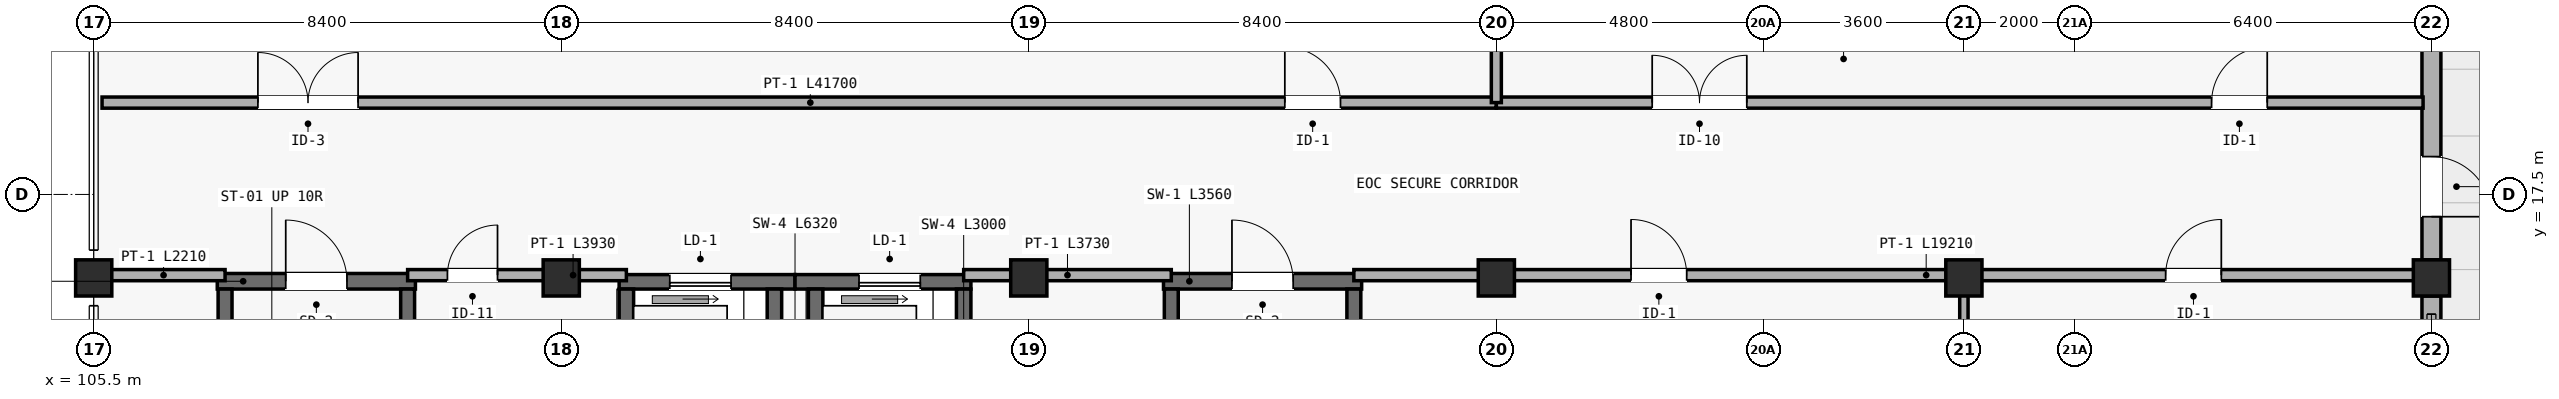
"""IFC4 building model, lengths in metres.
Left out: names, types, materials, properties, quantities, classifications, styles, units other than length and angle.
Written with IfcOpenShell. Run it as: python <this file> out.ifc"""

import sys

from ifc_helpers import new_model, si_unit, direction, frame, frame_2d, origin, origin_2d, place, context, subcontext, project, spatial, rectangle, extrude, element, fill, save


model = new_model("IFC4")
c1 = context("Model", 3, precision=1e-05, world=origin(), true_north=direction((0.0, 1.0)))
c2 = subcontext(c1, "Body", "Model", "MODEL_VIEW")
j1 = project(units=[si_unit("LENGTHUNIT", "METRE"), si_unit("PLANEANGLEUNIT", "RADIAN")], contexts=[c1])
p1 = place(None, origin())
s1 = spatial("IfcSite", under=j1, at=p1, CompositionType="ELEMENT")
p2 = place(p1, origin())
s2 = spatial("IfcBuilding", under=s1, at=p2, CompositionType="ELEMENT")
p3 = place(p2, frame((0.0, 0.0, 9.3)))
s3 = spatial("IfcBuildingStorey", under=s2, at=p3, CompositionType="ELEMENT", Elevation=9.3)
for number, where, z_axis, x_axis in (
    (1, (105.5, 16.0, 0.0), (0.0, 0.0, 1.0), (1.0, 0.0, 0.0)),
    (2, (113.9, 16.0, 0.0), (0.0, 0.0, 1.0), (1.0, 0.0, 0.0)),
    (3, (122.3, 16.0, 0.0), (0.0, 0.0, 1.0), (1.0, 0.0, 0.0)),
    (4, (130.7, 16.0, 0.0), (0.0, 0.0, 1.0), (1.0, 0.0, 0.0)),
    (5, (139.1, 16.0, 0.0), (0.0, 0.0, 1.0), (1.0, 0.0, 0.0)),
    (6, (147.5, 16.0, 0.0), (0.0, 0.0, 1.0), (1.0, 0.0, 0.0)),
):
    element("IfcColumn", number, at=place(p3, frame(where, z_axis=z_axis, x_axis=x_axis)), inside=s3, PredefinedType="COLUMN", context=c2, shape_type="SweptSolid", body=[
        extrude(rectangle(XDim=0.65, YDim=0.65, at=origin_2d()), origin(), (0.0, 0.0, 1.0), 3.45),
    ])
p4 = place(p3, frame((147.5, 9.325, 0.0), z_axis=(0.0, 0.0, 1.0), x_axis=(0.0, 1.0, 0.0)))
e7 = element("IfcWall", 7, at=p4, inside=s3, PredefinedType="STANDARD", context=c2, shape_type="SweptSolid", body=[
    extrude(rectangle(XDim=6.35, YDim=0.34, at=frame_2d((3.175, 0.0))), origin(), (0.0, 0.0, 1.0), 2.75),
])
p5 = place(p3, frame((147.5, 16.325, 0.0), z_axis=(0.0, 0.0, 1.0), x_axis=(0.0, 1.0, 0.0)))
e8 = element("IfcWall", 8, at=p5, inside=s3, PredefinedType="STANDARD", context=c2, shape_type="SweptSolid", body=[
    extrude(rectangle(XDim=7.85, YDim=0.34, at=frame_2d((3.925, 0.0))), origin(), (0.0, 0.0, 1.0), 2.75),
])
p6 = place(p5, frame((0.775, 0.0, 0.0)))
e9 = element("IfcOpeningElement", 9, at=p6, cuts=e8, PredefinedType="OPENING", context=c2, shape_type="SweptSolid", body=[
    extrude(rectangle(XDim=1.08, YDim=2.1, at=frame_2d((0.54, 1.05))), frame((0.0, 0.18, 0.0), z_axis=(0.0, -1.0, 0.0), x_axis=(1.0, 0.0, 0.0)), (0.0, 0.0, 1.0), 0.36),
])
p7 = place(p5, frame((3.925, 0.0, 0.75)))
e10 = element("IfcOpeningElement", 10, at=p7, cuts=e8, PredefinedType="OPENING", context=c2, shape_type="SweptSolid", body=[
    extrude(rectangle(XDim=1.75, YDim=1.55, at=frame_2d((0.875, 0.775))), frame((0.0, 0.18, 0.0), z_axis=(0.0, -1.0, 0.0), x_axis=(1.0, 0.0, 0.0)), (0.0, 0.0, 1.0), 0.36),
])
p8 = place(p3, frame((107.72, 15.94, 0.0), z_axis=(0.0, 0.0, 1.0), x_axis=(1.0, 0.0, 0.0)))
e11 = element("IfcWall", 11, at=p8, inside=s3, PredefinedType="SHEAR", context=c2, shape_type="SweptSolid", body=[
    extrude(rectangle(XDim=3.56, YDim=0.28, at=frame_2d((1.78, 0.0))), origin(), (0.0, 0.0, 1.0), 3.2),
])
p9 = place(p8, frame((1.23, 0.0, 0.0)))
e12 = element("IfcOpeningElement", 12, at=p9, cuts=e11, PredefinedType="OPENING", context=c2, shape_type="SweptSolid", body=[
    extrude(rectangle(XDim=1.1, YDim=2.15, at=frame_2d((0.55, 1.075))), frame((0.0, 0.15, 0.0), z_axis=(0.0, -1.0, 0.0), x_axis=(1.0, 0.0, 0.0)), (0.0, 0.0, 1.0), 0.3),
])
for number, where, z_axis, x_axis in (
    (13, (107.86, 15.8, 0.0), (0.0, 0.0, 1.0), (0.0, -1.0, 0.0)),
    (14, (111.14, 9.5, 0.0), (0.0, 0.0, 1.0), (0.0, 1.0, 0.0)),
):
    element("IfcWall", number, at=place(p3, frame(where, z_axis=z_axis, x_axis=x_axis)), inside=s3, PredefinedType="SHEAR", context=c2, shape_type="SweptSolid", body=[
        extrude(rectangle(XDim=6.3, YDim=0.25, at=frame_2d((3.15, 0.0))), origin(), (0.0, 0.0, 1.0), 3.2),
    ])
p10 = place(p3, frame((124.72, 15.94, 0.0), z_axis=(0.0, 0.0, 1.0), x_axis=(1.0, 0.0, 0.0)))
e15 = element("IfcWall", 15, at=p10, inside=s3, PredefinedType="SHEAR", context=c2, shape_type="SweptSolid", body=[
    extrude(rectangle(XDim=3.56, YDim=0.28, at=frame_2d((1.78, 0.0))), origin(), (0.0, 0.0, 1.0), 3.2),
])
p11 = place(p10, frame((1.23, 0.0, 0.0)))
e16 = element("IfcOpeningElement", 16, at=p11, cuts=e15, PredefinedType="OPENING", context=c2, shape_type="SweptSolid", body=[
    extrude(rectangle(XDim=1.1, YDim=2.15, at=frame_2d((0.55, 1.075))), frame((0.0, 0.15, 0.0), z_axis=(0.0, -1.0, 0.0), x_axis=(1.0, 0.0, 0.0)), (0.0, 0.0, 1.0), 0.3),
])
for number, where, z_axis, x_axis in (
    (17, (124.86, 15.8, 0.0), (0.0, 0.0, 1.0), (0.0, -1.0, 0.0)),
    (18, (128.14, 9.5, 0.0), (0.0, 0.0, 1.0), (0.0, 1.0, 0.0)),
):
    element("IfcWall", number, at=place(p3, frame(where, z_axis=z_axis, x_axis=x_axis)), inside=s3, PredefinedType="SHEAR", context=c2, shape_type="SweptSolid", body=[
        extrude(rectangle(XDim=6.3, YDim=0.25, at=frame_2d((3.15, 0.0))), origin(), (0.0, 0.0, 1.0), 3.2),
    ])
p12 = place(p3, frame((118.1, 15.93, 0.0), z_axis=(0.0, 0.0, 1.0), x_axis=(-1.0, 0.0, 0.0)))
e19 = element("IfcWall", 19, at=p12, inside=s3, PredefinedType="SHEAR", context=c2, shape_type="SweptSolid", body=[
    extrude(rectangle(XDim=3.16, YDim=0.26, at=frame_2d((1.58, 0.0))), origin(), (0.0, 0.0, 1.0), 3.2),
])
p13 = place(p12, frame((1.15, 0.0, 0.0)))
e20 = element("IfcOpeningElement", 20, at=p13, cuts=e19, PredefinedType="OPENING", context=c2, shape_type="SweptSolid", body=[
    extrude(rectangle(XDim=1.1, YDim=2.15, at=frame_2d((0.55, 1.075))), frame((0.0, 0.14, 0.0), z_axis=(0.0, -1.0, 0.0), x_axis=(1.0, 0.0, 0.0)), (0.0, 0.0, 1.0), 0.28),
])
for number, where, z_axis, x_axis in (
    (21, (115.07, 15.8, 0.0), (0.0, 0.0, 1.0), (0.0, -1.0, 0.0)),
    (22, (117.73, 12.8, 0.0), (0.0, 0.0, 1.0), (0.0, 1.0, 0.0)),
):
    element("IfcWall", number, at=place(p3, frame(where, z_axis=z_axis, x_axis=x_axis)), inside=s3, PredefinedType="SHEAR", context=c2, shape_type="SweptSolid", body=[
        extrude(rectangle(XDim=3.0, YDim=0.26, at=frame_2d((1.5, 0.0))), origin(), (0.0, 0.0, 1.0), 3.2),
    ])
p14 = place(p3, frame((121.26, 15.93, 0.0), z_axis=(0.0, 0.0, 1.0), x_axis=(-1.0, 0.0, 0.0)))
e23 = element("IfcWall", 23, at=p14, inside=s3, PredefinedType="SHEAR", context=c2, shape_type="SweptSolid", body=[
    extrude(rectangle(XDim=3.16, YDim=0.26, at=frame_2d((1.58, 0.0))), origin(), (0.0, 0.0, 1.0), 3.2),
])
p15 = place(p14, frame((0.91, 0.0, 0.0)))
e24 = element("IfcOpeningElement", 24, at=p15, cuts=e23, PredefinedType="OPENING", context=c2, shape_type="SweptSolid", body=[
    extrude(rectangle(XDim=1.1, YDim=2.15, at=frame_2d((0.55, 1.075))), frame((0.0, 0.14, 0.0), z_axis=(0.0, -1.0, 0.0), x_axis=(1.0, 0.0, 0.0)), (0.0, 0.0, 1.0), 0.28),
])
for number, where, z_axis, x_axis in (
    (25, (118.47, 15.8, 0.0), (0.0, 0.0, 1.0), (0.0, -1.0, 0.0)),
    (26, (121.13, 12.8, 0.0), (0.0, 0.0, 1.0), (0.0, 1.0, 0.0)),
):
    element("IfcWall", number, at=place(p3, frame(where, z_axis=z_axis, x_axis=x_axis)), inside=s3, PredefinedType="SHEAR", context=c2, shape_type="SweptSolid", body=[
        extrude(rectangle(XDim=3.0, YDim=0.26, at=frame_2d((1.5, 0.0))), origin(), (0.0, 0.0, 1.0), 3.2),
    ])
p16 = place(p3, frame((105.65, 16.05, 0.0), z_axis=(0.0, 0.0, 1.0), x_axis=(1.0, 0.0, 0.0)))
e27 = element("IfcWall", 27, at=p16, inside=s3, PredefinedType="PARTITIONING", context=c2, shape_type="SweptSolid", body=[
    extrude(rectangle(XDim=2.21, YDim=0.2, at=frame_2d((1.105, 0.0))), origin(), (0.0, 0.0, 1.0), 2.7),
])
p17 = place(p3, frame((111.14, 16.05, 0.0), z_axis=(0.0, 0.0, 1.0), x_axis=(1.0, 0.0, 0.0)))
e28 = element("IfcWall", 28, at=p17, inside=s3, PredefinedType="PARTITIONING", context=c2, shape_type="SweptSolid", body=[
    extrude(rectangle(XDim=3.93, YDim=0.2, at=frame_2d((1.965, 0.0))), origin(), (0.0, 0.0, 1.0), 2.7),
])
p18 = place(p17, frame((0.715, 0.0, 0.0)))
e29 = element("IfcOpeningElement", 29, at=p18, cuts=e28, PredefinedType="OPENING", context=c2, shape_type="SweptSolid", body=[
    extrude(rectangle(XDim=0.9, YDim=2.08, at=frame_2d((0.45, 1.04))), frame((0.0, 0.11, 0.0), z_axis=(0.0, -1.0, 0.0), x_axis=(1.0, 0.0, 0.0)), (0.0, 0.0, 1.0), 0.22),
])
p19 = place(p3, frame((121.13, 16.05, 0.0), z_axis=(0.0, 0.0, 1.0), x_axis=(1.0, 0.0, 0.0)))
e30 = element("IfcWall", 30, at=p19, inside=s3, PredefinedType="PARTITIONING", context=c2, shape_type="SweptSolid", body=[
    extrude(rectangle(XDim=3.73, YDim=0.2, at=frame_2d((1.865, 0.0))), origin(), (0.0, 0.0, 1.0), 2.7),
])
p20 = place(p3, frame((128.14, 16.05, 0.0), z_axis=(0.0, 0.0, 1.0), x_axis=(1.0, 0.0, 0.0)))
e31 = element("IfcWall", 31, at=p20, inside=s3, PredefinedType="PARTITIONING", context=c2, shape_type="SweptSolid", body=[
    extrude(rectangle(XDim=10.96, YDim=0.2, at=frame_2d((5.48, 0.0))), origin(), (0.0, 0.0, 1.0), 2.7),
])
p21 = place(p20, frame((4.98, 0.0, 0.0)))
e32 = element("IfcOpeningElement", 32, at=p21, cuts=e31, PredefinedType="OPENING", context=c2, shape_type="SweptSolid", body=[
    extrude(rectangle(XDim=1.0, YDim=2.12, at=frame_2d((0.5, 1.06))), frame((0.0, 0.11, 0.0), z_axis=(0.0, -1.0, 0.0), x_axis=(1.0, 0.0, 0.0)), (0.0, 0.0, 1.0), 0.22),
])
p22 = place(p3, frame((139.1, 16.05, 0.0), z_axis=(0.0, 0.0, 1.0), x_axis=(1.0, 0.0, 0.0)))
e33 = element("IfcWall", 33, at=p22, inside=s3, PredefinedType="PARTITIONING", context=c2, shape_type="SweptSolid", body=[
    extrude(rectangle(XDim=8.25, YDim=0.2, at=frame_2d((4.125, 0.0))), origin(), (0.0, 0.0, 1.0), 2.7),
])
p23 = place(p22, frame((3.625, 0.0, 0.0)))
e34 = element("IfcOpeningElement", 34, at=p23, cuts=e33, PredefinedType="OPENING", context=c2, shape_type="SweptSolid", body=[
    extrude(rectangle(XDim=1.0, YDim=2.12, at=frame_2d((0.5, 1.06))), frame((0.0, 0.11, 0.0), z_axis=(0.0, -1.0, 0.0), x_axis=(1.0, 0.0, 0.0)), (0.0, 0.0, 1.0), 0.22),
])
p24 = place(p3, frame((139.1, 9.15, 0.0), z_axis=(0.0, 0.0, 1.0), x_axis=(0.0, 1.0, 0.0)))
e35 = element("IfcWall", 35, at=p24, inside=s3, PredefinedType="PARTITIONING", context=c2, shape_type="SweptSolid", body=[
    extrude(rectangle(XDim=6.9, YDim=0.15, at=frame_2d((3.45, 0.0))), origin(), (0.0, 0.0, 1.0), 2.7),
])
p25 = place(p3, frame((105.65, 19.15, 0.0), z_axis=(0.0, 0.0, 1.0), x_axis=(1.0, 0.0, 0.0)))
e36 = element("IfcWall", 36, at=p25, inside=s3, PredefinedType="PARTITIONING", context=c2, shape_type="SweptSolid", body=[
    extrude(rectangle(XDim=25.05, YDim=0.2, at=frame_2d((12.525, 0.0))), origin(), (0.0, 0.0, 1.0), 2.7),
])
p26 = place(p25, frame((2.8, 0.0, 0.0)))
e37 = element("IfcOpeningElement", 37, at=p26, cuts=e36, PredefinedType="OPENING", context=c2, shape_type="SweptSolid", body=[
    extrude(rectangle(XDim=1.8, YDim=2.18, at=frame_2d((0.9, 1.09))), frame((0.0, 0.11, 0.0), z_axis=(0.0, -1.0, 0.0), x_axis=(1.0, 0.0, 0.0)), (0.0, 0.0, 1.0), 0.22),
])
p27 = place(p25, frame((21.25, 0.0, 0.0)))
e38 = element("IfcOpeningElement", 38, at=p27, cuts=e36, PredefinedType="OPENING", context=c2, shape_type="SweptSolid", body=[
    extrude(rectangle(XDim=1.0, YDim=2.12, at=frame_2d((0.5, 1.06))), frame((0.0, 0.11, 0.0), z_axis=(0.0, -1.0, 0.0), x_axis=(1.0, 0.0, 0.0)), (0.0, 0.0, 1.0), 0.22),
])
p28 = place(p3, frame((130.7, 19.15, 0.0), z_axis=(0.0, 0.0, 1.0), x_axis=(1.0, 0.0, 0.0)))
e39 = element("IfcWall", 39, at=p28, inside=s3, PredefinedType="PARTITIONING", context=c2, shape_type="SweptSolid", body=[
    extrude(rectangle(XDim=16.65, YDim=0.2, at=frame_2d((8.325, 0.0))), origin(), (0.0, 0.0, 1.0), 2.7),
])
p29 = place(p28, frame((2.8, 0.0, 0.0)))
e40 = element("IfcOpeningElement", 40, at=p29, cuts=e39, PredefinedType="OPENING", context=c2, shape_type="SweptSolid", body=[
    extrude(rectangle(XDim=1.7, YDim=2.16, at=frame_2d((0.85, 1.08))), frame((0.0, 0.11, 0.0), z_axis=(0.0, -1.0, 0.0), x_axis=(1.0, 0.0, 0.0)), (0.0, 0.0, 1.0), 0.22),
])
p30 = place(p28, frame((12.85, 0.0, 0.0)))
e41 = element("IfcOpeningElement", 41, at=p30, cuts=e39, PredefinedType="OPENING", context=c2, shape_type="SweptSolid", body=[
    extrude(rectangle(XDim=1.0, YDim=2.12, at=frame_2d((0.5, 1.06))), frame((0.0, 0.11, 0.0), z_axis=(0.0, -1.0, 0.0), x_axis=(1.0, 0.0, 0.0)), (0.0, 0.0, 1.0), 0.22),
])
p31 = place(p3, frame((130.7, 19.15, 0.0), z_axis=(0.0, 0.0, 1.0), x_axis=(0.0, 1.0, 0.0)))
e42 = element("IfcWall", 42, at=p31, inside=s3, PredefinedType="PARTITIONING", context=c2, shape_type="SweptSolid", body=[
    extrude(rectangle(XDim=13.7, YDim=0.18, at=frame_2d((6.85, 0.0))), origin(), (0.0, 0.0, 1.0), 2.7),
])
p32 = place(p6, frame((1.08, 0.0, 0.0), z_axis=(0.0, 0.0, 1.0), x_axis=(-1.0, 0.0, 0.0)))
e43 = element("IfcDoor", 43, at=p32, inside=s3, OperationType="SINGLE_SWING_LEFT", PredefinedType="DOOR", context=c2, shape_type="SweptSolid", body=[
    extrude(rectangle(XDim=1.08, YDim=2.1, at=frame_2d((0.54, 1.05))), frame((0.0, 0.025, 0.0), z_axis=(0.0, -1.0, 0.0), x_axis=(1.0, 0.0, 0.0)), (0.0, 0.0, 1.0), 0.05),
])
fill(e9, e43)
p33 = place(p9, origin())
e44 = element("IfcDoor", 44, at=p33, inside=s3, OperationType="SINGLE_SWING_LEFT", PredefinedType="DOOR", context=c2, shape_type="SweptSolid", body=[
    extrude(rectangle(XDim=1.1, YDim=2.15, at=frame_2d((0.55, 1.075))), frame((0.0, 0.025, 0.0), z_axis=(0.0, -1.0, 0.0), x_axis=(1.0, 0.0, 0.0)), (0.0, 0.0, 1.0), 0.05),
])
fill(e12, e44)
p34 = place(p11, origin())
e45 = element("IfcDoor", 45, at=p34, inside=s3, OperationType="SINGLE_SWING_LEFT", PredefinedType="DOOR", context=c2, shape_type="SweptSolid", body=[
    extrude(rectangle(XDim=1.1, YDim=2.15, at=frame_2d((0.55, 1.075))), frame((0.0, 0.025, 0.0), z_axis=(0.0, -1.0, 0.0), x_axis=(1.0, 0.0, 0.0)), (0.0, 0.0, 1.0), 0.05),
])
fill(e16, e45)
p35 = place(p13, origin())
e46 = element("IfcDoor", 46, at=p35, inside=s3, OperationType="SLIDING_TO_LEFT", PredefinedType="DOOR", context=c2, shape_type="SweptSolid", body=[
    extrude(rectangle(XDim=1.1, YDim=2.15, at=frame_2d((0.55, 1.075))), frame((0.0, 0.025, 0.0), z_axis=(0.0, -1.0, 0.0), x_axis=(1.0, 0.0, 0.0)), (0.0, 0.0, 1.0), 0.05),
])
fill(e20, e46)
p36 = place(p15, origin())
e47 = element("IfcDoor", 47, at=p36, inside=s3, OperationType="SLIDING_TO_LEFT", PredefinedType="DOOR", context=c2, shape_type="SweptSolid", body=[
    extrude(rectangle(XDim=1.1, YDim=2.15, at=frame_2d((0.55, 1.075))), frame((0.0, 0.025, 0.0), z_axis=(0.0, -1.0, 0.0), x_axis=(1.0, 0.0, 0.0)), (0.0, 0.0, 1.0), 0.05),
])
fill(e24, e47)
p37 = place(p18, origin())
e48 = element("IfcDoor", 48, at=p37, inside=s3, OperationType="SINGLE_SWING_RIGHT", PredefinedType="DOOR", context=c2, shape_type="SweptSolid", body=[
    extrude(rectangle(XDim=0.9, YDim=2.08, at=frame_2d((0.45, 1.04))), frame((0.0, 0.025, 0.0), z_axis=(0.0, -1.0, 0.0), x_axis=(1.0, 0.0, 0.0)), (0.0, 0.0, 1.0), 0.05),
])
fill(e29, e48)
p38 = place(p21, origin())
e49 = element("IfcDoor", 49, at=p38, inside=s3, OperationType="SINGLE_SWING_LEFT", PredefinedType="DOOR", context=c2, shape_type="SweptSolid", body=[
    extrude(rectangle(XDim=1.0, YDim=2.12, at=frame_2d((0.5, 1.06))), frame((0.0, 0.025, 0.0), z_axis=(0.0, -1.0, 0.0), x_axis=(1.0, 0.0, 0.0)), (0.0, 0.0, 1.0), 0.05),
])
fill(e32, e49)
p39 = place(p23, origin())
e50 = element("IfcDoor", 50, at=p39, inside=s3, OperationType="SINGLE_SWING_RIGHT", PredefinedType="DOOR", context=c2, shape_type="SweptSolid", body=[
    extrude(rectangle(XDim=1.0, YDim=2.12, at=frame_2d((0.5, 1.06))), frame((0.0, 0.025, 0.0), z_axis=(0.0, -1.0, 0.0), x_axis=(1.0, 0.0, 0.0)), (0.0, 0.0, 1.0), 0.05),
])
fill(e34, e50)
p40 = place(p26, origin())
e51 = element("IfcDoor", 51, at=p40, inside=s3, OperationType="DOUBLE_DOOR_SINGLE_SWING", PredefinedType="DOOR", context=c2, shape_type="SweptSolid", body=[
    extrude(rectangle(XDim=1.8, YDim=2.18, at=frame_2d((0.9, 1.09))), frame((0.0, 0.025, 0.0), z_axis=(0.0, -1.0, 0.0), x_axis=(1.0, 0.0, 0.0)), (0.0, 0.0, 1.0), 0.05),
])
fill(e37, e51)
p41 = place(p27, origin())
e52 = element("IfcDoor", 52, at=p41, inside=s3, OperationType="SINGLE_SWING_LEFT", PredefinedType="DOOR", context=c2, shape_type="SweptSolid", body=[
    extrude(rectangle(XDim=1.0, YDim=2.12, at=frame_2d((0.5, 1.06))), frame((0.0, 0.025, 0.0), z_axis=(0.0, -1.0, 0.0), x_axis=(1.0, 0.0, 0.0)), (0.0, 0.0, 1.0), 0.05),
])
fill(e38, e52)
p42 = place(p29, origin())
e53 = element("IfcDoor", 53, at=p42, inside=s3, OperationType="DOUBLE_DOOR_SINGLE_SWING", PredefinedType="DOOR", context=c2, shape_type="SweptSolid", body=[
    extrude(rectangle(XDim=1.7, YDim=2.16, at=frame_2d((0.85, 1.08))), frame((0.0, 0.025, 0.0), z_axis=(0.0, -1.0, 0.0), x_axis=(1.0, 0.0, 0.0)), (0.0, 0.0, 1.0), 0.05),
])
fill(e40, e53)
p43 = place(p30, origin())
e54 = element("IfcDoor", 54, at=p43, inside=s3, OperationType="SINGLE_SWING_RIGHT", PredefinedType="DOOR", context=c2, shape_type="SweptSolid", body=[
    extrude(rectangle(XDim=1.0, YDim=2.12, at=frame_2d((0.5, 1.06))), frame((0.0, 0.025, 0.0), z_axis=(0.0, -1.0, 0.0), x_axis=(1.0, 0.0, 0.0)), (0.0, 0.0, 1.0), 0.05),
])
fill(e41, e54)
save(model, sys.argv[1])
